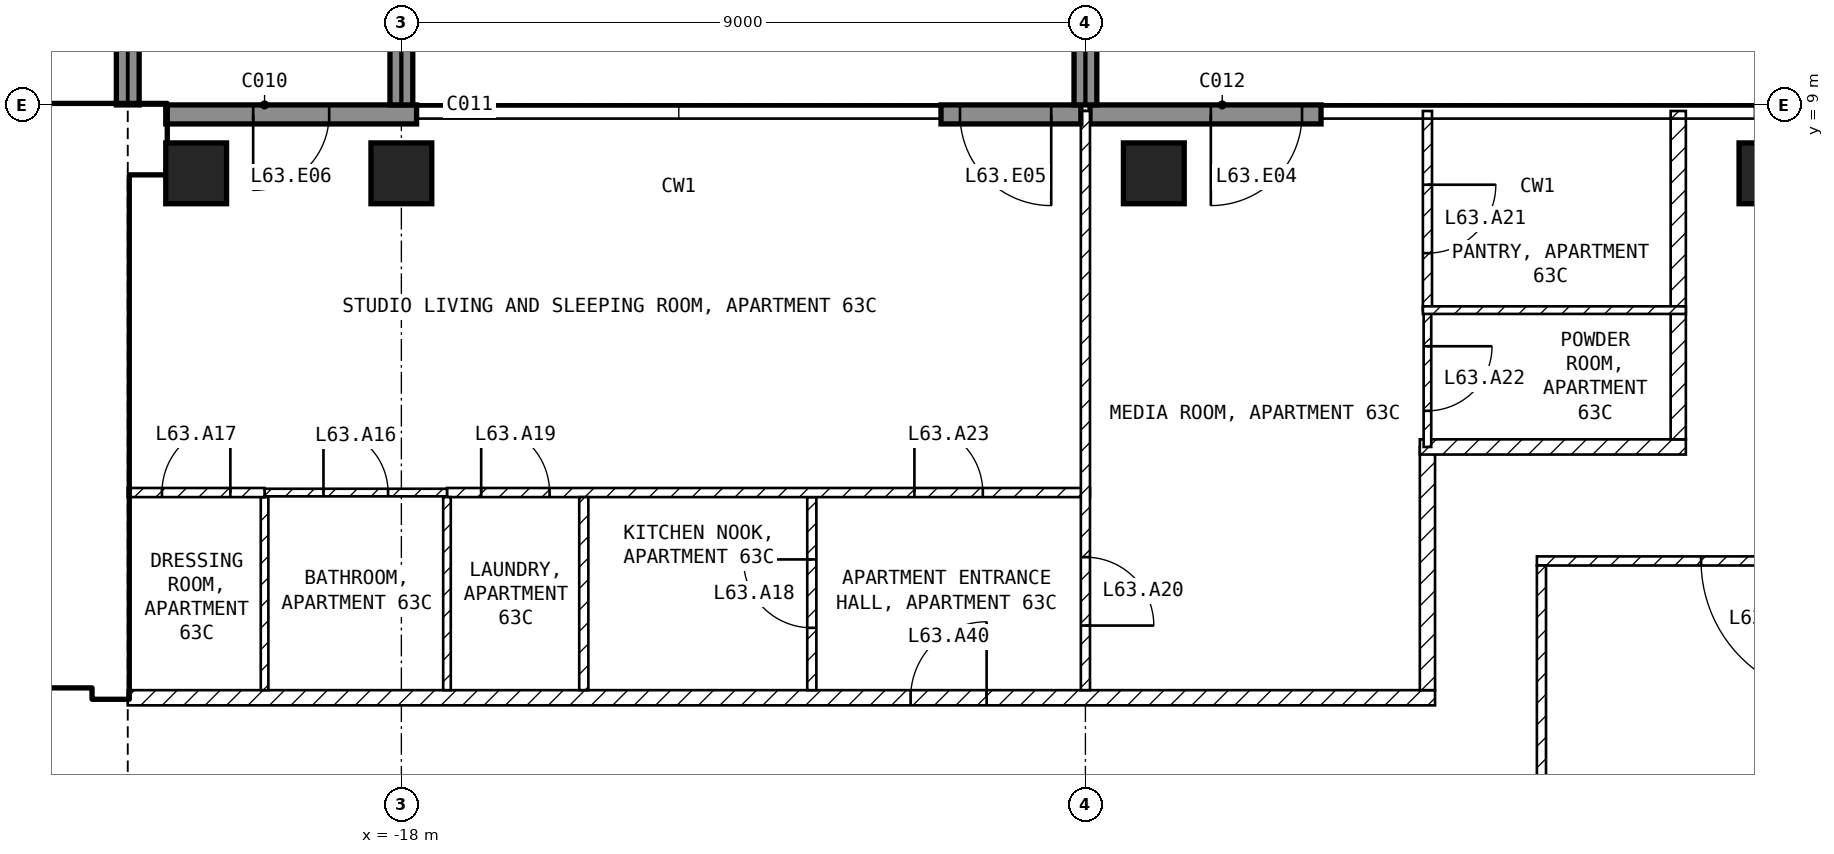
"""IFC4 building model, lengths in metres.
Left out: names, types, materials, properties, quantities, classifications, styles, units other than length and angle.
Written with IfcOpenShell. Run it as: python <this file> out.ifc"""

import sys

from ifc_helpers import new_model, si_unit, direction, frame, frame_2d, origin, origin_2d, place, context, subcontext, project, spatial, rectangle, extrude, element, fill, save


model = new_model("IFC4")
c1 = context("Model", 3, precision=1e-05, world=origin(), true_north=direction((0.0, 1.0)))
c2 = subcontext(c1, "Body", "Model", "MODEL_VIEW")
j1 = project(units=[si_unit("LENGTHUNIT", "METRE"), si_unit("PLANEANGLEUNIT", "RADIAN")], contexts=[c1])
p1 = place(None, origin())
s1 = spatial("IfcSite", under=j1, at=p1, CompositionType="ELEMENT")
p2 = place(p1, origin())
s2 = spatial("IfcBuilding", under=s1, at=p2, CompositionType="ELEMENT")
p3 = place(p2, frame((0.0, 0.0, 250.0)))
s3 = spatial("IfcBuildingStorey", under=s2, at=p3, CompositionType="ELEMENT", Elevation=250.0)
for number, where, z_axis, x_axis in (
    (1, (-20.7, 8.1, -0.25), (0.0, 0.0, 1.0), (1.0, 0.0, 0.0)),
    (2, (-18.0, 8.1, -0.25), (0.0, 0.0, 1.0), (1.0, 0.0, 0.0)),
    (3, (-8.1, 8.1, -0.25), (0.0, 0.0, 1.0), (1.0, 0.0, 0.0)),
    (4, (0.0, 8.1, -0.25), (0.0, 0.0, 1.0), (1.0, 0.0, 0.0)),
):
    element("IfcColumn", number, at=place(p3, frame(where, z_axis=z_axis, x_axis=x_axis)), inside=s3, PredefinedType="COLUMN", context=c2, shape_type="SweptSolid", body=[
        extrude(rectangle(XDim=0.8, YDim=0.8, at=origin_2d()), origin(), (0.0, 0.0, 1.0), 3.5),
    ])
p4 = place(p3, frame((-5.9, 8.875, 0.0), z_axis=(0.0, 0.0, 1.0), x_axis=(-1.0, 0.0, 0.0)))
e5 = element("IfcWall", 5, at=p4, inside=s3, PredefinedType="SOLIDWALL", context=c2, shape_type="SweptSolid", body=[
    extrude(rectangle(XDim=3.04, YDim=0.25, at=frame_2d((1.52, 0.0))), origin(), (0.0, 0.0, 1.0), 3.25),
])
p5 = place(p4, frame((0.25, 0.0, 0.0)))
e6 = element("IfcOpeningElement", 6, at=p5, cuts=e5, PredefinedType="OPENING", context=c2, shape_type="SweptSolid", body=[
    extrude(rectangle(XDim=1.2, YDim=2.4, at=frame_2d((0.6, 1.2))), frame((0.0, 0.135, 0.0), z_axis=(0.0, -1.0, 0.0), x_axis=(1.0, 0.0, 0.0)), (0.0, 0.0, 1.0), 0.27),
])
p6 = place(p3, frame((-9.06, 8.875, 0.0), z_axis=(0.0, 0.0, 1.0), x_axis=(-1.0, 0.0, 0.0)))
e7 = element("IfcWall", 7, at=p6, inside=s3, PredefinedType="SOLIDWALL", context=c2, shape_type="SweptSolid", body=[
    extrude(rectangle(XDim=1.84, YDim=0.25, at=frame_2d((0.92, 0.0))), origin(), (0.0, 0.0, 1.0), 3.25),
])
p7 = place(p6, frame((0.39, 0.0, 0.0)))
e8 = element("IfcOpeningElement", 8, at=p7, cuts=e7, PredefinedType="OPENING", context=c2, shape_type="SweptSolid", body=[
    extrude(rectangle(XDim=1.2, YDim=2.4, at=frame_2d((0.6, 1.2))), frame((0.0, 0.135, 0.0), z_axis=(0.0, -1.0, 0.0), x_axis=(1.0, 0.0, 0.0)), (0.0, 0.0, 1.0), 0.27),
])
p8 = place(p3, frame((-17.8, 8.875, 0.0), z_axis=(0.0, 0.0, 1.0), x_axis=(-1.0, 0.0, 0.0)))
e9 = element("IfcWall", 9, at=p8, inside=s3, PredefinedType="SOLIDWALL", context=c2, shape_type="SweptSolid", body=[
    extrude(rectangle(XDim=3.3, YDim=0.25, at=frame_2d((1.65, 0.0))), origin(), (0.0, 0.0, 1.0), 3.25),
])
p9 = place(p8, frame((1.15, 0.0, 0.0)))
e10 = element("IfcOpeningElement", 10, at=p9, cuts=e9, PredefinedType="OPENING", context=c2, shape_type="SweptSolid", body=[
    extrude(rectangle(XDim=1.0, YDim=2.4, at=frame_2d((0.5, 1.2))), frame((0.0, 0.135, 0.0), z_axis=(0.0, -1.0, 0.0), x_axis=(1.0, 0.0, 0.0)), (0.0, 0.0, 1.0), 0.27),
])
for number, where, z_axis, x_axis in (
    (11, (-21.6, 9.0, 0.0), (0.0, 0.0, 1.0), (0.0, 1.0, 0.0)),
    (12, (-18.0, 9.0, 0.0), (0.0, 0.0, 1.0), (0.0, 1.0, 0.0)),
    (13, (-9.0, 9.0, 0.0), (0.0, 0.0, 1.0), (0.0, 1.0, 0.0)),
):
    element("IfcWall", number, at=place(p3, frame(where, z_axis=z_axis, x_axis=x_axis)), inside=s3, PredefinedType="SOLIDWALL", context=c2, shape_type="SweptSolid", body=[
        extrude(rectangle(XDim=2.7, YDim=0.3, at=frame_2d((1.35, 0.0))), origin(), (0.0, 0.0, 1.0), 3.25),
    ])
p10 = place(p3, frame((-29.75, 8.55, 0.0), z_axis=(0.0, 0.0, 1.0), x_axis=(1.0, 0.0, 0.0)))
e14 = element("IfcWall", 14, at=p10, inside=s3, PredefinedType="SHEAR", context=c2, shape_type="SweptSolid", body=[
    extrude(rectangle(XDim=8.65, YDim=0.9, at=frame_2d((4.325, 0.0))), origin(), (0.0, 0.0, 1.0), 3.25),
])
p11 = place(p3, frame((-21.825, 1.2, 0.0), z_axis=(0.0, 0.0, 1.0), x_axis=(0.0, 1.0, 0.0)))
e15 = element("IfcWall", 15, at=p11, inside=s3, PredefinedType="SHEAR", context=c2, shape_type="SweptSolid", body=[
    extrude(rectangle(XDim=6.9, YDim=0.45, at=frame_2d((3.45, 0.0))), origin(), (0.0, 0.0, 1.0), 3.25),
])
p12 = place(p3, frame((-33.35, 1.45, 0.0), z_axis=(0.0, 0.0, 1.0), x_axis=(1.0, 0.0, 0.0)))
e16 = element("IfcWall", 16, at=p12, inside=s3, PredefinedType="SOLIDWALL", context=c2, shape_type="SweptSolid", body=[
    extrude(rectangle(XDim=11.3, YDim=0.2, at=frame_2d((5.65, 0.0))), origin(), (0.0, 0.0, 1.0), 3.25),
])
p13 = place(p12, frame((9.55, 0.0, 0.0)))
e17 = element("IfcOpeningElement", 17, at=p13, cuts=e16, PredefinedType="OPENING", context=c2, shape_type="SweptSolid", body=[
    extrude(rectangle(XDim=1.0, YDim=2.1, at=frame_2d((0.5, 1.05))), frame((0.0, 0.11, 0.0), z_axis=(0.0, -1.0, 0.0), x_axis=(1.0, 0.0, 0.0)), (0.0, 0.0, 1.0), 0.22),
])
p14 = place(p12, frame((7.05, 0.0, 0.0)))
e18 = element("IfcOpeningElement", 18, at=p14, cuts=e16, PredefinedType="OPENING", context=c2, shape_type="SweptSolid", body=[
    extrude(rectangle(XDim=1.0, YDim=2.1, at=frame_2d((0.5, 1.05))), frame((0.0, 0.11, 0.0), z_axis=(0.0, -1.0, 0.0), x_axis=(1.0, 0.0, 0.0)), (0.0, 0.0, 1.0), 0.22),
])
p15 = place(p12, frame((1.175, 0.0, 0.0)))
e19 = element("IfcOpeningElement", 19, at=p15, cuts=e16, PredefinedType="OPENING", context=c2, shape_type="SweptSolid", body=[
    extrude(rectangle(XDim=0.9, YDim=2.1, at=frame_2d((0.45, 1.05))), frame((0.0, 0.11, 0.0), z_axis=(0.0, -1.0, 0.0), x_axis=(1.0, 0.0, 0.0)), (0.0, 0.0, 1.0), 0.22),
])
p16 = place(p3, frame((-28.35, 5.15, 0.0), z_axis=(0.0, 0.0, 1.0), x_axis=(1.0, 0.0, 0.0)))
e20 = element("IfcWall", 20, at=p16, inside=s3, PredefinedType="SOLIDWALL", context=c2, shape_type="SweptSolid", body=[
    extrude(rectangle(XDim=6.3, YDim=0.2, at=frame_2d((3.15, 0.0))), origin(), (0.0, 0.0, 1.0), 3.25),
])
p17 = place(p16, frame((5.1, 0.0, 0.0)))
e21 = element("IfcOpeningElement", 21, at=p17, cuts=e20, PredefinedType="OPENING", context=c2, shape_type="SweptSolid", body=[
    extrude(rectangle(XDim=1.0, YDim=2.1, at=frame_2d((0.5, 1.05))), frame((0.0, 0.11, 0.0), z_axis=(0.0, -1.0, 0.0), x_axis=(1.0, 0.0, 0.0)), (0.0, 0.0, 1.0), 0.22),
])
p18 = place(p3, frame((3.06, 3.0, 0.0), z_axis=(0.0, 0.0, 1.0), x_axis=(-1.0, 0.0, 0.0)))
e22 = element("IfcWall", 22, at=p18, inside=s3, PredefinedType="PARTITIONING", context=c2, shape_type="SweptSolid", body=[
    extrude(rectangle(XDim=6.12, YDim=0.12, at=frame_2d((3.06, 0.0))), origin(), (0.0, 0.0, 1.0), 3.25),
])
p19 = place(p18, frame((2.16, 0.0, 0.0)))
e23 = element("IfcOpeningElement", 23, at=p19, cuts=e22, PredefinedType="OPENING", context=c2, shape_type="SweptSolid", body=[
    extrude(rectangle(XDim=1.8, YDim=2.1, at=frame_2d((0.9, 1.05))), frame((0.0, 0.07, 0.0), z_axis=(0.0, -1.0, 0.0), x_axis=(1.0, 0.0, 0.0)), (0.0, 0.0, 1.0), 0.14),
])
p20 = place(p3, frame((-3.0, 2.94, 0.0), z_axis=(0.0, 0.0, 1.0), x_axis=(0.0, -1.0, 0.0)))
e24 = element("IfcWall", 24, at=p20, inside=s3, PredefinedType="PARTITIONING", context=c2, shape_type="SweptSolid", body=[
    extrude(rectangle(XDim=5.88, YDim=0.12, at=frame_2d((2.94, 0.0))), origin(), (0.0, 0.0, 1.0), 3.25),
])
p21 = place(p3, frame((-21.6, 1.2, 0.0), z_axis=(0.0, 0.0, 1.0), x_axis=(1.0, 0.0, 0.0)))
e25 = element("IfcWall", 25, at=p21, inside=s3, PredefinedType="PARTITIONING", context=c2, shape_type="SweptSolid", body=[
    extrude(rectangle(XDim=17.2, YDim=0.2, at=frame_2d((8.6, 0.0))), origin(), (0.0, 0.0, 1.0), 3.25),
])
p22 = place(p21, frame((10.3, 0.0, 0.0)))
e26 = element("IfcOpeningElement", 26, at=p22, cuts=e25, PredefinedType="OPENING", context=c2, shape_type="SweptSolid", body=[
    extrude(rectangle(XDim=1.0, YDim=2.1, at=frame_2d((0.5, 1.05))), frame((0.0, 0.11, 0.0), z_axis=(0.0, -1.0, 0.0), x_axis=(1.0, 0.0, 0.0)), (0.0, 0.0, 1.0), 0.22),
])
p23 = place(p3, frame((-4.5, 1.3, 0.0), z_axis=(0.0, 0.0, 1.0), x_axis=(0.0, 1.0, 0.0)))
e27 = element("IfcWall", 27, at=p23, inside=s3, PredefinedType="PARTITIONING", context=c2, shape_type="SweptSolid", body=[
    extrude(rectangle(XDim=3.2, YDim=0.2, at=frame_2d((1.6, 0.0))), origin(), (0.0, 0.0, 1.0), 3.25),
])
p24 = place(p3, frame((-4.6, 4.5, 0.0), z_axis=(0.0, 0.0, 1.0), x_axis=(1.0, 0.0, 0.0)))
e28 = element("IfcWall", 28, at=p24, inside=s3, PredefinedType="PARTITIONING", context=c2, shape_type="SweptSolid", body=[
    extrude(rectangle(XDim=3.5, YDim=0.2, at=frame_2d((1.75, 0.0))), origin(), (0.0, 0.0, 1.0), 3.25),
])
p25 = place(p3, frame((-1.2, 4.6, 0.0), z_axis=(0.0, 0.0, 1.0), x_axis=(0.0, 1.0, 0.0)))
e29 = element("IfcWall", 29, at=p25, inside=s3, PredefinedType="PARTITIONING", context=c2, shape_type="SweptSolid", body=[
    extrude(rectangle(XDim=4.32, YDim=0.2, at=frame_2d((2.16, 0.0))), origin(), (0.0, 0.0, 1.0), 3.25),
])
p26 = place(p3, frame((-12.6, 1.3, 0.0), z_axis=(0.0, 0.0, 1.0), x_axis=(0.0, 1.0, 0.0)))
e30 = element("IfcWall", 30, at=p26, inside=s3, PredefinedType="PARTITIONING", context=c2, shape_type="SweptSolid", body=[
    extrude(rectangle(XDim=2.54, YDim=0.12, at=frame_2d((1.27, 0.0))), origin(), (0.0, 0.0, 1.0), 3.25),
])
p27 = place(p26, frame((0.82, 0.0, 0.0)))
e31 = element("IfcOpeningElement", 31, at=p27, cuts=e30, PredefinedType="OPENING", context=c2, shape_type="SweptSolid", body=[
    extrude(rectangle(XDim=0.9, YDim=2.1, at=frame_2d((0.45, 1.05))), frame((0.0, 0.07, 0.0), z_axis=(0.0, -1.0, 0.0), x_axis=(1.0, 0.0, 0.0)), (0.0, 0.0, 1.0), 0.14),
])
p28 = place(p3, frame((-17.4, 3.9, 0.0), z_axis=(0.0, 0.0, 1.0), x_axis=(1.0, 0.0, 0.0)))
e32 = element("IfcWall", 32, at=p28, inside=s3, PredefinedType="PARTITIONING", context=c2, shape_type="SweptSolid", body=[
    extrude(rectangle(XDim=8.46, YDim=0.12, at=frame_2d((4.23, 0.0))), origin(), (0.0, 0.0, 1.0), 3.25),
])
p29 = place(p28, frame((0.45, 0.0, 0.0)))
e33 = element("IfcOpeningElement", 33, at=p29, cuts=e32, PredefinedType="OPENING", context=c2, shape_type="SweptSolid", body=[
    extrude(rectangle(XDim=0.9, YDim=2.1, at=frame_2d((0.45, 1.05))), frame((0.0, 0.07, 0.0), z_axis=(0.0, -1.0, 0.0), x_axis=(1.0, 0.0, 0.0)), (0.0, 0.0, 1.0), 0.14),
])
p30 = place(p28, frame((6.15, 0.0, 0.0)))
e34 = element("IfcOpeningElement", 34, at=p30, cuts=e32, PredefinedType="OPENING", context=c2, shape_type="SweptSolid", body=[
    extrude(rectangle(XDim=0.9, YDim=2.1, at=frame_2d((0.45, 1.05))), frame((0.0, 0.07, 0.0), z_axis=(0.0, -1.0, 0.0), x_axis=(1.0, 0.0, 0.0)), (0.0, 0.0, 1.0), 0.14),
])
p31 = place(p3, frame((-9.0, 8.92, 0.0), z_axis=(0.0, 0.0, 1.0), x_axis=(0.0, -1.0, 0.0)))
e35 = element("IfcWall", 35, at=p31, inside=s3, PredefinedType="PARTITIONING", context=c2, shape_type="SweptSolid", body=[
    extrude(rectangle(XDim=7.62, YDim=0.12, at=frame_2d((3.81, 0.0))), origin(), (0.0, 0.0, 1.0), 3.25),
])
p32 = place(p31, frame((5.87, 0.0, 0.0)))
e36 = element("IfcOpeningElement", 36, at=p32, cuts=e35, PredefinedType="OPENING", context=c2, shape_type="SweptSolid", body=[
    extrude(rectangle(XDim=0.9, YDim=2.1, at=frame_2d((0.45, 1.05))), frame((0.0, 0.07, 0.0), z_axis=(0.0, -1.0, 0.0), x_axis=(1.0, 0.0, 0.0)), (0.0, 0.0, 1.0), 0.14),
])
p33 = place(p3, frame((-15.6, 1.3, 0.0), z_axis=(0.0, 0.0, 1.0), x_axis=(0.0, 1.0, 0.0)))
e37 = element("IfcWall", 37, at=p33, inside=s3, PredefinedType="PARTITIONING", context=c2, shape_type="SweptSolid", body=[
    extrude(rectangle(XDim=2.54, YDim=0.12, at=frame_2d((1.27, 0.0))), origin(), (0.0, 0.0, 1.0), 3.25),
])
for number, where, z_axis, x_axis in (
    (38, (-17.4, 1.3, 0.0), (0.0, 0.0, 1.0), (0.0, 1.0, 0.0)),
    (39, (-19.8, 1.3, 0.0), (0.0, 0.0, 1.0), (0.0, 1.0, 0.0)),
):
    element("IfcWall", number, at=place(p3, frame(where, z_axis=z_axis, x_axis=x_axis)), inside=s3, PredefinedType="PARTITIONING", context=c2, shape_type="SweptSolid", body=[
        extrude(rectangle(XDim=2.54, YDim=0.1, at=frame_2d((1.27, 0.0))), origin(), (0.0, 0.0, 1.0), 3.25),
    ])
p34 = place(p3, frame((-19.8, 3.9, 0.0), z_axis=(0.0, 0.0, 1.0), x_axis=(1.0, 0.0, 0.0)))
e40 = element("IfcWall", 40, at=p34, inside=s3, PredefinedType="PARTITIONING", context=c2, shape_type="SweptSolid", body=[
    extrude(rectangle(XDim=2.4, YDim=0.1, at=frame_2d((1.2, 0.0))), origin(), (0.0, 0.0, 1.0), 3.25),
])
p35 = place(p34, frame((0.775, 0.0, 0.0)))
e41 = element("IfcOpeningElement", 41, at=p35, cuts=e40, PredefinedType="OPENING", context=c2, shape_type="SweptSolid", body=[
    extrude(rectangle(XDim=0.85, YDim=2.1, at=frame_2d((0.425, 1.05))), frame((0.0, 0.06, 0.0), z_axis=(0.0, -1.0, 0.0), x_axis=(1.0, 0.0, 0.0)), (0.0, 0.0, 1.0), 0.12),
])
p36 = place(p3, frame((-21.6, 3.9, 0.0), z_axis=(0.0, 0.0, 1.0), x_axis=(1.0, 0.0, 0.0)))
e42 = element("IfcWall", 42, at=p36, inside=s3, PredefinedType="PARTITIONING", context=c2, shape_type="SweptSolid", body=[
    extrude(rectangle(XDim=1.8, YDim=0.12, at=frame_2d((0.9, 0.0))), origin(), (0.0, 0.0, 1.0), 3.25),
])
p37 = place(p36, frame((0.45, 0.0, 0.0)))
e43 = element("IfcOpeningElement", 43, at=p37, cuts=e42, PredefinedType="OPENING", context=c2, shape_type="SweptSolid", body=[
    extrude(rectangle(XDim=0.9, YDim=2.1, at=frame_2d((0.45, 1.05))), frame((0.0, 0.07, 0.0), z_axis=(0.0, -1.0, 0.0), x_axis=(1.0, 0.0, 0.0)), (0.0, 0.0, 1.0), 0.14),
])
p38 = place(p3, frame((-4.5, 6.3, 0.0), z_axis=(0.0, 0.0, 1.0), x_axis=(0.0, -1.0, 0.0)))
e44 = element("IfcWall", 44, at=p38, inside=s3, PredefinedType="PARTITIONING", context=c2, shape_type="SweptSolid", body=[
    extrude(rectangle(XDim=1.8, YDim=0.1, at=frame_2d((0.9, 0.0))), origin(), (0.0, 0.0, 1.0), 3.25),
])
p39 = place(p38, frame((0.475, 0.0, 0.0)))
e45 = element("IfcOpeningElement", 45, at=p39, cuts=e44, PredefinedType="OPENING", context=c2, shape_type="SweptSolid", body=[
    extrude(rectangle(XDim=0.85, YDim=2.1, at=frame_2d((0.425, 1.05))), frame((0.0, 0.06, 0.0), z_axis=(0.0, -1.0, 0.0), x_axis=(1.0, 0.0, 0.0)), (0.0, 0.0, 1.0), 0.12),
])
p40 = place(p3, frame((-4.5, 8.92, 0.0), z_axis=(0.0, 0.0, 1.0), x_axis=(0.0, -1.0, 0.0)))
e46 = element("IfcWall", 46, at=p40, inside=s3, PredefinedType="PARTITIONING", context=c2, shape_type="SweptSolid", body=[
    extrude(rectangle(XDim=2.62, YDim=0.12, at=frame_2d((1.31, 0.0))), origin(), (0.0, 0.0, 1.0), 3.25),
])
p41 = place(p40, frame((0.97, 0.0, 0.0)))
e47 = element("IfcOpeningElement", 47, at=p41, cuts=e46, PredefinedType="OPENING", context=c2, shape_type="SweptSolid", body=[
    extrude(rectangle(XDim=0.9, YDim=2.1, at=frame_2d((0.45, 1.05))), frame((0.0, 0.07, 0.0), z_axis=(0.0, -1.0, 0.0), x_axis=(1.0, 0.0, 0.0)), (0.0, 0.0, 1.0), 0.14),
])
p42 = place(p3, frame((-4.56, 6.3, 0.0), z_axis=(0.0, 0.0, 1.0), x_axis=(1.0, 0.0, 0.0)))
e48 = element("IfcWall", 48, at=p42, inside=s3, PredefinedType="PARTITIONING", context=c2, shape_type="SweptSolid", body=[
    extrude(rectangle(XDim=3.46, YDim=0.1, at=frame_2d((1.73, 0.0))), origin(), (0.0, 0.0, 1.0), 3.25),
])
p43 = place(p5, origin())
e49 = element("IfcDoor", 49, at=p43, inside=s3, OperationType="SINGLE_SWING_RIGHT", PredefinedType="DOOR", context=c2, shape_type="SweptSolid", body=[
    extrude(rectangle(XDim=1.2, YDim=2.4, at=frame_2d((0.6, 1.2))), frame((0.0, 0.025, 0.0), z_axis=(0.0, -1.0, 0.0), x_axis=(1.0, 0.0, 0.0)), (0.0, 0.0, 1.0), 0.05),
])
fill(e6, e49)
p44 = place(p7, origin())
e50 = element("IfcDoor", 50, at=p44, inside=s3, OperationType="SINGLE_SWING_LEFT", PredefinedType="DOOR", context=c2, shape_type="SweptSolid", body=[
    extrude(rectangle(XDim=1.2, YDim=2.4, at=frame_2d((0.6, 1.2))), frame((0.0, 0.025, 0.0), z_axis=(0.0, -1.0, 0.0), x_axis=(1.0, 0.0, 0.0)), (0.0, 0.0, 1.0), 0.05),
])
fill(e8, e50)
p45 = place(p9, origin())
e51 = element("IfcDoor", 51, at=p45, inside=s3, OperationType="SINGLE_SWING_RIGHT", PredefinedType="DOOR", context=c2, shape_type="SweptSolid", body=[
    extrude(rectangle(XDim=1.0, YDim=2.4, at=frame_2d((0.5, 1.2))), frame((0.0, 0.025, 0.0), z_axis=(0.0, -1.0, 0.0), x_axis=(1.0, 0.0, 0.0)), (0.0, 0.0, 1.0), 0.05),
])
fill(e10, e51)
p46 = place(p17, origin())
e52 = element("IfcDoor", 52, at=p46, inside=s3, OperationType="SINGLE_SWING_LEFT", PredefinedType="DOOR", context=c2, shape_type="SweptSolid", body=[
    extrude(rectangle(XDim=1.0, YDim=2.1, at=frame_2d((0.5, 1.05))), frame((0.0, 0.025, 0.0), z_axis=(0.0, -1.0, 0.0), x_axis=(1.0, 0.0, 0.0)), (0.0, 0.0, 1.0), 0.05),
])
fill(e21, e52)
p47 = place(p19, origin())
e53 = element("IfcDoor", 53, at=p47, inside=s3, OperationType="SINGLE_SWING_LEFT", PredefinedType="DOOR", context=c2, shape_type="SweptSolid", body=[
    extrude(rectangle(XDim=1.8, YDim=2.1, at=frame_2d((0.9, 1.05))), frame((0.0, 0.025, 0.0), z_axis=(0.0, -1.0, 0.0), x_axis=(1.0, 0.0, 0.0)), (0.0, 0.0, 1.0), 0.05),
])
fill(e23, e53)
p48 = place(p35, origin())
e54 = element("IfcDoor", 54, at=p48, inside=s3, OperationType="SINGLE_SWING_LEFT", PredefinedType="DOOR", context=c2, shape_type="SweptSolid", body=[
    extrude(rectangle(XDim=0.85, YDim=2.1, at=frame_2d((0.425, 1.05))), frame((0.0, 0.025, 0.0), z_axis=(0.0, -1.0, 0.0), x_axis=(1.0, 0.0, 0.0)), (0.0, 0.0, 1.0), 0.05),
])
fill(e41, e54)
p49 = place(p37, origin())
e55 = element("IfcDoor", 55, at=p49, inside=s3, OperationType="SINGLE_SWING_RIGHT", PredefinedType="DOOR", context=c2, shape_type="SweptSolid", body=[
    extrude(rectangle(XDim=0.9, YDim=2.1, at=frame_2d((0.45, 1.05))), frame((0.0, 0.025, 0.0), z_axis=(0.0, -1.0, 0.0), x_axis=(1.0, 0.0, 0.0)), (0.0, 0.0, 1.0), 0.05),
])
fill(e43, e55)
p50 = place(p27, origin())
e56 = element("IfcDoor", 56, at=p50, inside=s3, OperationType="SINGLE_SWING_RIGHT", PredefinedType="DOOR", context=c2, shape_type="SweptSolid", body=[
    extrude(rectangle(XDim=0.9, YDim=2.1, at=frame_2d((0.45, 1.05))), frame((0.0, 0.025, 0.0), z_axis=(0.0, -1.0, 0.0), x_axis=(1.0, 0.0, 0.0)), (0.0, 0.0, 1.0), 0.05),
])
fill(e31, e56)
p51 = place(p29, origin())
e57 = element("IfcDoor", 57, at=p51, inside=s3, OperationType="SINGLE_SWING_LEFT", PredefinedType="DOOR", context=c2, shape_type="SweptSolid", body=[
    extrude(rectangle(XDim=0.9, YDim=2.1, at=frame_2d((0.45, 1.05))), frame((0.0, 0.025, 0.0), z_axis=(0.0, -1.0, 0.0), x_axis=(1.0, 0.0, 0.0)), (0.0, 0.0, 1.0), 0.05),
])
fill(e33, e57)
p52 = place(p32, origin())
e58 = element("IfcDoor", 58, at=p52, inside=s3, OperationType="SINGLE_SWING_RIGHT", PredefinedType="DOOR", context=c2, shape_type="SweptSolid", body=[
    extrude(rectangle(XDim=0.9, YDim=2.1, at=frame_2d((0.45, 1.05))), frame((0.0, 0.025, 0.0), z_axis=(0.0, -1.0, 0.0), x_axis=(1.0, 0.0, 0.0)), (0.0, 0.0, 1.0), 0.05),
])
fill(e36, e58)
p53 = place(p41, origin())
e59 = element("IfcDoor", 59, at=p53, inside=s3, OperationType="SINGLE_SWING_LEFT", PredefinedType="DOOR", context=c2, shape_type="SweptSolid", body=[
    extrude(rectangle(XDim=0.9, YDim=2.1, at=frame_2d((0.45, 1.05))), frame((0.0, 0.025, 0.0), z_axis=(0.0, -1.0, 0.0), x_axis=(1.0, 0.0, 0.0)), (0.0, 0.0, 1.0), 0.05),
])
fill(e47, e59)
p54 = place(p39, origin())
e60 = element("IfcDoor", 60, at=p54, inside=s3, OperationType="SINGLE_SWING_LEFT", PredefinedType="DOOR", context=c2, shape_type="SweptSolid", body=[
    extrude(rectangle(XDim=0.85, YDim=2.1, at=frame_2d((0.425, 1.05))), frame((0.0, 0.025, 0.0), z_axis=(0.0, -1.0, 0.0), x_axis=(1.0, 0.0, 0.0)), (0.0, 0.0, 1.0), 0.05),
])
fill(e45, e60)
p55 = place(p30, origin())
e61 = element("IfcDoor", 61, at=p55, inside=s3, OperationType="SINGLE_SWING_LEFT", PredefinedType="DOOR", context=c2, shape_type="SweptSolid", body=[
    extrude(rectangle(XDim=0.9, YDim=2.1, at=frame_2d((0.45, 1.05))), frame((0.0, 0.025, 0.0), z_axis=(0.0, -1.0, 0.0), x_axis=(1.0, 0.0, 0.0)), (0.0, 0.0, 1.0), 0.05),
])
fill(e34, e61)
p56 = place(p22, origin())
e62 = element("IfcDoor", 62, at=p56, inside=s3, OperationType="SINGLE_SWING_RIGHT", PredefinedType="DOOR", context=c2, shape_type="SweptSolid", body=[
    extrude(rectangle(XDim=1.0, YDim=2.1, at=frame_2d((0.5, 1.05))), frame((0.0, 0.025, 0.0), z_axis=(0.0, -1.0, 0.0), x_axis=(1.0, 0.0, 0.0)), (0.0, 0.0, 1.0), 0.05),
])
fill(e26, e62)
save(model, sys.argv[1])
